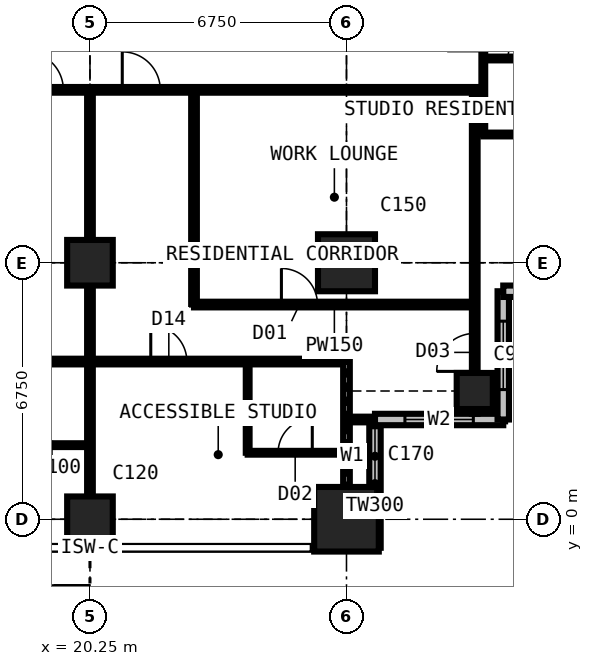
"""IFC4 building model, lengths in metres.
Left out: names, types, materials, properties, quantities, classifications, styles, units other than length and angle.
Written with IfcOpenShell. Run it as: python <this file> out.ifc"""

import sys

from ifc_helpers import new_model, si_unit, direction, frame, frame_2d, origin, origin_2d, place, context, subcontext, project, spatial, rectangle, extrude, element, fill, save


model = new_model("IFC4")
c1 = context("Model", 3, precision=1e-05, world=origin(), true_north=direction((0.0, 1.0)))
c2 = subcontext(c1, "Body", "Model", "MODEL_VIEW")
j1 = project(units=[si_unit("LENGTHUNIT", "METRE"), si_unit("PLANEANGLEUNIT", "RADIAN")], contexts=[c1])
p1 = place(None, origin())
s1 = spatial("IfcSite", under=j1, at=p1, CompositionType="ELEMENT")
p2 = place(p1, origin())
s2 = spatial("IfcBuilding", under=s1, at=p2, CompositionType="ELEMENT")
p3 = place(p2, frame((0.0, 0.0, 196.2)))
s3 = spatial("IfcBuildingStorey", under=s2, at=p3, CompositionType="ELEMENT", Elevation=196.2)
for number, where, z_axis, x_axis in (
    (1, (20.25, 0.0, 0.0), (0.0, 0.0, 1.0), (1.0, 0.0, 0.0)),
    (2, (20.25, 6.75, 0.0), (0.0, 0.0, 1.0), (1.0, 0.0, 0.0)),
):
    element("IfcColumn", number, at=place(p3, frame(where, z_axis=z_axis, x_axis=x_axis)), inside=s3, PredefinedType="COLUMN", context=c2, shape_type="SweptSolid", body=[
        extrude(rectangle(XDim=1.2, YDim=1.2, at=origin_2d()), origin(), (0.0, 0.0, 1.0), 3.6),
    ])
p4 = place(p3, frame((27.0, 0.0, 0.0), z_axis=(0.0, 0.0, 1.0), x_axis=(1.0, 0.0, 0.0)))
e3 = element("IfcColumn", 3, at=p4, inside=s3, PredefinedType="COLUMN", context=c2, shape_type="SweptSolid", body=[
    extrude(rectangle(XDim=1.7, YDim=1.7, at=origin_2d()), origin(), (0.0, 0.0, 1.0), 3.6),
])
p5 = place(p3, frame((27.0, 6.75, 0.0), z_axis=(0.0, 0.0, 1.0), x_axis=(1.0, 0.0, 0.0)))
e4 = element("IfcColumn", 4, at=p5, inside=s3, PredefinedType="COLUMN", context=c2, shape_type="SweptSolid", body=[
    extrude(rectangle(XDim=1.5, YDim=1.5, at=origin_2d()), origin(), (0.0, 0.0, 1.0), 3.6),
])
p6 = place(p3, frame((30.375, 3.375, 0.0), z_axis=(0.0, 0.0, 1.0), x_axis=(1.0, 0.0, 0.0)))
e5 = element("IfcColumn", 5, at=p6, inside=s3, PredefinedType="COLUMN", context=c2, shape_type="SweptSolid", body=[
    extrude(rectangle(XDim=0.95, YDim=0.95, at=origin_2d()), origin(), (0.0, 0.0, 1.0), 3.6),
])
p7 = place(p3, frame((27.75, -0.75, 0.0), z_axis=(0.0, 0.0, 1.0), x_axis=(0.0, 1.0, 0.0)))
e6 = element("IfcWall", 6, at=p7, inside=s3, PredefinedType="SOLIDWALL", context=c2, shape_type="SweptSolid", body=[
    extrude(rectangle(XDim=3.375, YDim=0.3, at=frame_2d((1.688, 0.0))), origin(), (0.0, 0.0, 1.0), 3.3),
])
p8 = place(p7, frame((1.657, 0.0, 0.9)))
e7 = element("IfcOpeningElement", 7, at=p8, cuts=e6, PredefinedType="OPENING", context=c2, shape_type="SweptSolid", body=[
    extrude(rectangle(XDim=1.5, YDim=1.8, at=frame_2d((0.75, 0.9))), frame((0.0, 0.16, 0.0), z_axis=(0.0, -1.0, 0.0), x_axis=(1.0, 0.0, 0.0)), (0.0, 0.0, 1.0), 0.32),
])
p9 = place(p3, frame((27.75, 2.625, 0.0), z_axis=(0.0, 0.0, 1.0), x_axis=(1.0, 0.0, 0.0)))
e8 = element("IfcWall", 8, at=p9, inside=s3, PredefinedType="SOLIDWALL", context=c2, shape_type="SweptSolid", body=[
    extrude(rectangle(XDim=3.375, YDim=0.3, at=frame_2d((1.688, 0.0))), origin(), (0.0, 0.0, 1.0), 3.3),
])
p10 = place(p9, frame((0.788, 0.0, 0.6)))
e9 = element("IfcOpeningElement", 9, at=p10, cuts=e8, PredefinedType="OPENING", context=c2, shape_type="SweptSolid", body=[
    extrude(rectangle(XDim=1.8, YDim=2.1, at=frame_2d((0.9, 1.05))), frame((0.0, 0.16, 0.0), z_axis=(0.0, -1.0, 0.0), x_axis=(1.0, 0.0, 0.0)), (0.0, 0.0, 1.0), 0.32),
])
p11 = place(p3, frame((31.125, 2.625, 0.0), z_axis=(0.0, 0.0, 1.0), x_axis=(0.0, 1.0, 0.0)))
e10 = element("IfcWall", 10, at=p11, inside=s3, PredefinedType="SOLIDWALL", context=c2, shape_type="SweptSolid", body=[
    extrude(rectangle(XDim=3.375, YDim=0.3, at=frame_2d((1.688, 0.0))), origin(), (0.0, 0.0, 1.0), 3.3),
])
p12 = place(p11, frame((0.788, 0.0, 0.6)))
e11 = element("IfcOpeningElement", 11, at=p12, cuts=e10, PredefinedType="OPENING", context=c2, shape_type="SweptSolid", body=[
    extrude(rectangle(XDim=1.8, YDim=2.1, at=frame_2d((0.9, 1.05))), frame((0.0, 0.16, 0.0), z_axis=(0.0, -1.0, 0.0), x_axis=(1.0, 0.0, 0.0)), (0.0, 0.0, 1.0), 0.32),
])
p13 = place(p3, frame((31.125, 6.0, 0.0), z_axis=(0.0, 0.0, 1.0), x_axis=(1.0, 0.0, 0.0)))
e12 = element("IfcWall", 12, at=p13, inside=s3, PredefinedType="SOLIDWALL", context=c2, shape_type="SweptSolid", body=[
    extrude(rectangle(XDim=3.375, YDim=0.3, at=frame_2d((1.688, 0.0))), origin(), (0.0, 0.0, 1.0), 3.3),
])
p14 = place(p13, frame((0.788, 0.0, 0.6)))
e13 = element("IfcOpeningElement", 13, at=p14, cuts=e12, PredefinedType="OPENING", context=c2, shape_type="SweptSolid", body=[
    extrude(rectangle(XDim=1.8, YDim=2.1, at=frame_2d((0.9, 1.05))), frame((0.0, 0.16, 0.0), z_axis=(0.0, -1.0, 0.0), x_axis=(1.0, 0.0, 0.0)), (0.0, 0.0, 1.0), 0.32),
])
p15 = place(p3, frame((6.75, 4.15, 0.0), z_axis=(0.0, 0.0, 1.0), x_axis=(1.0, 0.0, 0.0)))
e14 = element("IfcWall", 14, at=p15, inside=s3, PredefinedType="PARTITIONING", context=c2, shape_type="SweptSolid", body=[
    extrude(rectangle(XDim=20.25, YDim=0.15, at=frame_2d((10.125, 0.0))), origin(), (0.0, 0.0, 1.0), 3.3),
])
p16 = place(p15, frame((1.2, 0.0, 0.0)))
e15 = element("IfcOpeningElement", 15, at=p16, cuts=e14, PredefinedType="OPENING", context=c2, shape_type="SweptSolid", body=[
    extrude(rectangle(XDim=1.0, YDim=2.2, at=frame_2d((0.5, 1.1))), frame((0.0, 0.085, 0.0), z_axis=(0.0, -1.0, 0.0), x_axis=(1.0, 0.0, 0.0)), (0.0, 0.0, 1.0), 0.17),
])
p17 = place(p15, frame((3.575, 0.0, 0.0)))
e16 = element("IfcOpeningElement", 16, at=p17, cuts=e14, PredefinedType="OPENING", context=c2, shape_type="SweptSolid", body=[
    extrude(rectangle(XDim=0.95, YDim=2.2, at=frame_2d((0.475, 1.1))), frame((0.0, 0.085, 0.0), z_axis=(0.0, -1.0, 0.0), x_axis=(1.0, 0.0, 0.0)), (0.0, 0.0, 1.0), 0.17),
])
p18 = place(p15, frame((7.0, 0.0, 0.0)))
e17 = element("IfcOpeningElement", 17, at=p18, cuts=e14, PredefinedType="OPENING", context=c2, shape_type="SweptSolid", body=[
    extrude(rectangle(XDim=0.95, YDim=2.2, at=frame_2d((0.475, 1.1))), frame((0.0, 0.085, 0.0), z_axis=(0.0, -1.0, 0.0), x_axis=(1.0, 0.0, 0.0)), (0.0, 0.0, 1.0), 0.17),
])
p19 = place(p15, frame((10.375, 0.0, 0.0)))
e18 = element("IfcOpeningElement", 18, at=p19, cuts=e14, PredefinedType="OPENING", context=c2, shape_type="SweptSolid", body=[
    extrude(rectangle(XDim=0.95, YDim=2.2, at=frame_2d((0.475, 1.1))), frame((0.0, 0.085, 0.0), z_axis=(0.0, -1.0, 0.0), x_axis=(1.0, 0.0, 0.0)), (0.0, 0.0, 1.0), 0.17),
])
p20 = place(p15, frame((15.1, 0.0, 0.0)))
e19 = element("IfcOpeningElement", 19, at=p20, cuts=e14, PredefinedType="OPENING", context=c2, shape_type="SweptSolid", body=[
    extrude(rectangle(XDim=0.95, YDim=2.2, at=frame_2d((0.475, 1.1))), frame((0.0, 0.085, 0.0), z_axis=(0.0, -1.0, 0.0), x_axis=(1.0, 0.0, 0.0)), (0.0, 0.0, 1.0), 0.17),
])
p21 = place(p3, frame((10.125, 11.3, 0.0), z_axis=(0.0, 0.0, 1.0), x_axis=(1.0, 0.0, 0.0)))
e20 = element("IfcWall", 20, at=p21, inside=s3, PredefinedType="PARTITIONING", context=c2, shape_type="SweptSolid", body=[
    extrude(rectangle(XDim=20.475, YDim=0.15, at=frame_2d((10.238, 0.0))), origin(), (0.0, 0.0, 1.0), 3.3),
])
p22 = place(p21, frame((8.425, 0.0, 0.0)))
e21 = element("IfcOpeningElement", 21, at=p22, cuts=e20, PredefinedType="OPENING", context=c2, shape_type="SweptSolid", body=[
    extrude(rectangle(XDim=1.0, YDim=2.2, at=frame_2d((0.5, 1.1))), frame((0.0, 0.085, 0.0), z_axis=(0.0, -1.0, 0.0), x_axis=(1.0, 0.0, 0.0)), (0.0, 0.0, 1.0), 0.17),
])
p23 = place(p21, frame((10.975, 0.0, 0.0)))
e22 = element("IfcOpeningElement", 22, at=p23, cuts=e20, PredefinedType="OPENING", context=c2, shape_type="SweptSolid", body=[
    extrude(rectangle(XDim=1.0, YDim=2.2, at=frame_2d((0.5, 1.1))), frame((0.0, 0.085, 0.0), z_axis=(0.0, -1.0, 0.0), x_axis=(1.0, 0.0, 0.0)), (0.0, 0.0, 1.0), 0.17),
])
p24 = place(p21, frame((4.875, 0.0, 0.0)))
e23 = element("IfcOpeningElement", 23, at=p24, cuts=e20, PredefinedType="OPENING", context=c2, shape_type="SweptSolid", body=[
    extrude(rectangle(XDim=0.95, YDim=2.2, at=frame_2d((0.475, 1.1))), frame((0.0, 0.085, 0.0), z_axis=(0.0, -1.0, 0.0), x_axis=(1.0, 0.0, 0.0)), (0.0, 0.0, 1.0), 0.17),
])
p25 = place(p3, frame((18.25, 1.95, 0.0), z_axis=(0.0, 0.0, 1.0), x_axis=(1.0, 0.0, 0.0)))
e24 = element("IfcWall", 24, at=p25, inside=s3, PredefinedType="PARTITIONING", context=c2, shape_type="SweptSolid", body=[
    extrude(rectangle(XDim=2.0, YDim=0.1, at=frame_2d((1.0, 0.0))), origin(), (0.0, 0.0, 1.0), 3.3),
])
p26 = place(p3, frame((20.25, -0.734, 0.0), z_axis=(0.0, 0.0, 1.0), x_axis=(0.0, 1.0, 0.0)))
e25 = element("IfcWall", 25, at=p26, inside=s3, PredefinedType="PARTITIONING", context=c2, shape_type="SweptSolid", body=[
    extrude(rectangle(XDim=12.034, YDim=0.15, at=frame_2d((6.017, 0.0))), origin(), (0.0, 0.0, 1.0), 2.802),
])
p27 = place(p3, frame((22.988, 5.65, 0.0), z_axis=(0.0, 0.0, 1.0), x_axis=(1.0, 0.0, 0.0)))
e26 = element("IfcWall", 26, at=p27, inside=s3, PredefinedType="PARTITIONING", context=c2, shape_type="SweptSolid", body=[
    extrude(rectangle(XDim=7.387, YDim=0.15, at=frame_2d((3.694, 0.0))), origin(), (0.0, 0.0, 1.0), 3.3),
])
p28 = place(p27, frame((2.3, 0.0, 0.0)))
e27 = element("IfcOpeningElement", 27, at=p28, cuts=e26, PredefinedType="OPENING", context=c2, shape_type="SweptSolid", body=[
    extrude(rectangle(XDim=0.95, YDim=2.2, at=frame_2d((0.475, 1.1))), frame((0.0, 0.085, 0.0), z_axis=(0.0, -1.0, 0.0), x_axis=(1.0, 0.0, 0.0)), (0.0, 0.0, 1.0), 0.17),
])
p29 = place(p3, frame((22.988, 5.65, 0.0), z_axis=(0.0, 0.0, 1.0), x_axis=(0.0, 1.0, 0.0)))
e28 = element("IfcWall", 28, at=p29, inside=s3, PredefinedType="PARTITIONING", context=c2, shape_type="SweptSolid", body=[
    extrude(rectangle(XDim=5.65, YDim=0.15, at=frame_2d((2.825, 0.0))), origin(), (0.0, 0.0, 1.0), 3.3),
])
p30 = place(p3, frame((24.4, 1.75, 0.0), z_axis=(0.0, 0.0, 1.0), x_axis=(0.0, 1.0, 0.0)))
e29 = element("IfcWall", 29, at=p30, inside=s3, PredefinedType="PARTITIONING", context=c2, shape_type="SweptSolid", body=[
    extrude(rectangle(XDim=2.4, YDim=0.1, at=frame_2d((1.2, 0.0))), origin(), (0.0, 0.0, 1.0), 3.3),
])
p31 = place(p3, frame((24.4, 1.75, 0.0), z_axis=(0.0, 0.0, 1.0), x_axis=(1.0, 0.0, 0.0)))
e30 = element("IfcWall", 30, at=p31, inside=s3, PredefinedType="PARTITIONING", context=c2, shape_type="SweptSolid", body=[
    extrude(rectangle(XDim=2.6, YDim=0.1, at=frame_2d((1.3, 0.0))), origin(), (0.0, 0.0, 1.0), 3.3),
])
p32 = place(p31, frame((0.8, 0.0, 0.0)))
e31 = element("IfcOpeningElement", 31, at=p32, cuts=e30, PredefinedType="OPENING", context=c2, shape_type="SweptSolid", body=[
    extrude(rectangle(XDim=0.9, YDim=2.2, at=frame_2d((0.45, 1.1))), frame((0.0, 0.06, 0.0), z_axis=(0.0, -1.0, 0.0), x_axis=(1.0, 0.0, 0.0)), (0.0, 0.0, 1.0), 0.12),
])
p33 = place(p3, frame((27.0, -0.734, 0.0), z_axis=(0.0, 0.0, 1.0), x_axis=(0.0, 1.0, 0.0)))
e32 = element("IfcWall", 32, at=p33, inside=s3, PredefinedType="PARTITIONING", context=c2, shape_type="SweptSolid", body=[
    extrude(rectangle(XDim=4.884, YDim=0.175, at=frame_2d((2.442, 0.0))), origin(), (0.0, 0.0, 1.0), 2.802),
])
p34 = place(p3, frame((27.0, 2.625, 0.0), z_axis=(0.0, 0.0, 1.0), x_axis=(1.0, 0.0, 0.0)))
e33 = element("IfcWall", 33, at=p34, inside=s3, PredefinedType="PARTITIONING", context=c2, shape_type="SweptSolid", body=[
    extrude(rectangle(XDim=0.734, YDim=0.15, at=frame_2d((0.367, 0.0))), origin(), (0.0, 0.0, 1.0), 3.3),
])
p35 = place(p3, frame((30.375, 2.775, 0.0), z_axis=(0.0, 0.0, 1.0), x_axis=(0.0, 1.0, 0.0)))
e34 = element("IfcWall", 34, at=p35, inside=s3, PredefinedType="PARTITIONING", context=c2, shape_type="SweptSolid", body=[
    extrude(rectangle(XDim=8.525, YDim=0.15, at=frame_2d((4.263, 0.0))), origin(), (0.0, 0.0, 1.0), 2.802),
])
p36 = place(p35, frame((1.116, 0.0, 0.0)))
e35 = element("IfcOpeningElement", 35, at=p36, cuts=e34, PredefinedType="OPENING", context=c2, shape_type="SweptSolid", body=[
    extrude(rectangle(XDim=1.0, YDim=2.2, at=frame_2d((0.5, 1.1))), frame((0.0, 0.085, 0.0), z_axis=(0.0, -1.0, 0.0), x_axis=(1.0, 0.0, 0.0)), (0.0, 0.0, 1.0), 0.17),
])
p37 = place(p3, frame((30.6, 10.125, 0.0), z_axis=(0.0, 0.0, 1.0), x_axis=(0.0, 1.0, 0.0)))
e36 = element("IfcWall", 36, at=p37, inside=s3, PredefinedType="PARTITIONING", context=c2, shape_type="SweptSolid", body=[
    extrude(rectangle(XDim=3.375, YDim=0.1, at=frame_2d((1.688, 0.0))), origin(), (0.0, 0.0, 1.0), 3.3),
])
p38 = place(p37, frame((2.2, 0.0, 0.0)))
e37 = element("IfcOpeningElement", 37, at=p38, cuts=e36, PredefinedType="OPENING", context=c2, shape_type="SweptSolid", body=[
    extrude(rectangle(XDim=0.95, YDim=2.2, at=frame_2d((0.475, 1.1))), frame((0.0, 0.06, 0.0), z_axis=(0.0, -1.0, 0.0), x_axis=(1.0, 0.0, 0.0)), (0.0, 0.0, 1.0), 0.12),
])
p39 = place(p3, frame((30.6, 10.125, 0.0), z_axis=(0.0, 0.0, 1.0), x_axis=(1.0, 0.0, 0.0)))
e38 = element("IfcWall", 38, at=p39, inside=s3, PredefinedType="PARTITIONING", context=c2, shape_type="SweptSolid", body=[
    extrude(rectangle(XDim=3.884, YDim=0.1, at=frame_2d((1.942, 0.0))), origin(), (0.0, 0.0, 1.0), 3.3),
])
p40 = place(p3, frame((30.6, 12.125, 0.0), z_axis=(0.0, 0.0, 1.0), x_axis=(1.0, 0.0, 0.0)))
e39 = element("IfcWall", 39, at=p40, inside=s3, PredefinedType="PARTITIONING", context=c2, shape_type="SweptSolid", body=[
    extrude(rectangle(XDim=2.2, YDim=0.1, at=frame_2d((1.1, 0.0))), origin(), (0.0, 0.0, 1.0), 3.3),
])
p41 = place(p40, frame((0.65, 0.0, 0.0)))
e40 = element("IfcOpeningElement", 40, at=p41, cuts=e39, PredefinedType="OPENING", context=c2, shape_type="SweptSolid", body=[
    extrude(rectangle(XDim=0.9, YDim=2.2, at=frame_2d((0.45, 1.1))), frame((0.0, 0.06, 0.0), z_axis=(0.0, -1.0, 0.0), x_axis=(1.0, 0.0, 0.0)), (0.0, 0.0, 1.0), 0.12),
])
p42 = place(p8, origin())
e41 = element("IfcWindow", 41, at=p42, inside=s3, PartitioningType="SINGLE_PANEL", PredefinedType="WINDOW", context=c2, shape_type="SweptSolid", body=[
    extrude(rectangle(XDim=1.5, YDim=1.8, at=frame_2d((0.75, 0.9))), frame((0.0, 0.03, 0.0), z_axis=(0.0, -1.0, 0.0), x_axis=(1.0, 0.0, 0.0)), (0.0, 0.0, 1.0), 0.06),
])
fill(e7, e41)
p43 = place(p10, origin())
e42 = element("IfcWindow", 42, at=p43, inside=s3, PartitioningType="SINGLE_PANEL", PredefinedType="WINDOW", context=c2, shape_type="SweptSolid", body=[
    extrude(rectangle(XDim=1.8, YDim=2.1, at=frame_2d((0.9, 1.05))), frame((0.0, 0.03, 0.0), z_axis=(0.0, -1.0, 0.0), x_axis=(1.0, 0.0, 0.0)), (0.0, 0.0, 1.0), 0.06),
])
fill(e9, e42)
p44 = place(p12, origin())
e43 = element("IfcWindow", 43, at=p44, inside=s3, PartitioningType="SINGLE_PANEL", PredefinedType="WINDOW", context=c2, shape_type="SweptSolid", body=[
    extrude(rectangle(XDim=1.8, YDim=2.1, at=frame_2d((0.9, 1.05))), frame((0.0, 0.03, 0.0), z_axis=(0.0, -1.0, 0.0), x_axis=(1.0, 0.0, 0.0)), (0.0, 0.0, 1.0), 0.06),
])
fill(e11, e43)
p45 = place(p22, origin())
e44 = element("IfcDoor", 44, at=p45, inside=s3, OperationType="SINGLE_SWING_LEFT", PredefinedType="DOOR", context=c2, shape_type="SweptSolid", body=[
    extrude(rectangle(XDim=1.0, YDim=2.2, at=frame_2d((0.5, 1.1))), frame((0.0, 0.025, 0.0), z_axis=(0.0, -1.0, 0.0), x_axis=(1.0, 0.0, 0.0)), (0.0, 0.0, 1.0), 0.05),
])
fill(e21, e44)
p46 = place(p20, origin())
e45 = element("IfcDoor", 45, at=p46, inside=s3, OperationType="SINGLE_SWING_LEFT", PredefinedType="DOOR", context=c2, shape_type="SweptSolid", body=[
    extrude(rectangle(XDim=0.95, YDim=2.2, at=frame_2d((0.475, 1.1))), frame((0.0, 0.025, 0.0), z_axis=(0.0, -1.0, 0.0), x_axis=(1.0, 0.0, 0.0)), (0.0, 0.0, 1.0), 0.05),
])
fill(e19, e45)
p47 = place(p32, origin())
e46 = element("IfcDoor", 46, at=p47, inside=s3, OperationType="SINGLE_SWING_RIGHT", PredefinedType="DOOR", context=c2, shape_type="SweptSolid", body=[
    extrude(rectangle(XDim=0.9, YDim=2.2, at=frame_2d((0.45, 1.1))), frame((0.0, 0.025, 0.0), z_axis=(0.0, -1.0, 0.0), x_axis=(1.0, 0.0, 0.0)), (0.0, 0.0, 1.0), 0.05),
])
fill(e31, e46)
p48 = place(p23, origin())
e47 = element("IfcDoor", 47, at=p48, inside=s3, OperationType="SINGLE_SWING_LEFT", PredefinedType="DOOR", context=c2, shape_type="SweptSolid", body=[
    extrude(rectangle(XDim=1.0, YDim=2.2, at=frame_2d((0.5, 1.1))), frame((0.0, 0.025, 0.0), z_axis=(0.0, -1.0, 0.0), x_axis=(1.0, 0.0, 0.0)), (0.0, 0.0, 1.0), 0.05),
])
fill(e22, e47)
p49 = place(p28, origin())
e48 = element("IfcDoor", 48, at=p49, inside=s3, OperationType="SINGLE_SWING_LEFT", PredefinedType="DOOR", context=c2, shape_type="SweptSolid", body=[
    extrude(rectangle(XDim=0.95, YDim=2.2, at=frame_2d((0.475, 1.1))), frame((0.0, 0.025, 0.0), z_axis=(0.0, -1.0, 0.0), x_axis=(1.0, 0.0, 0.0)), (0.0, 0.0, 1.0), 0.05),
])
fill(e27, e48)
p50 = place(p36, origin())
e49 = element("IfcDoor", 49, at=p50, inside=s3, OperationType="SINGLE_SWING_LEFT", PredefinedType="DOOR", context=c2, shape_type="SweptSolid", body=[
    extrude(rectangle(XDim=1.0, YDim=2.2, at=frame_2d((0.5, 1.1))), frame((0.0, 0.025, 0.0), z_axis=(0.0, -1.0, 0.0), x_axis=(1.0, 0.0, 0.0)), (0.0, 0.0, 1.0), 0.05),
])
fill(e35, e49)
p51 = place(p41, origin())
e50 = element("IfcDoor", 50, at=p51, inside=s3, OperationType="SINGLE_SWING_RIGHT", PredefinedType="DOOR", context=c2, shape_type="SweptSolid", body=[
    extrude(rectangle(XDim=0.9, YDim=2.2, at=frame_2d((0.45, 1.1))), frame((0.0, 0.025, 0.0), z_axis=(0.0, -1.0, 0.0), x_axis=(1.0, 0.0, 0.0)), (0.0, 0.0, 1.0), 0.05),
])
fill(e40, e50)
save(model, sys.argv[1])
